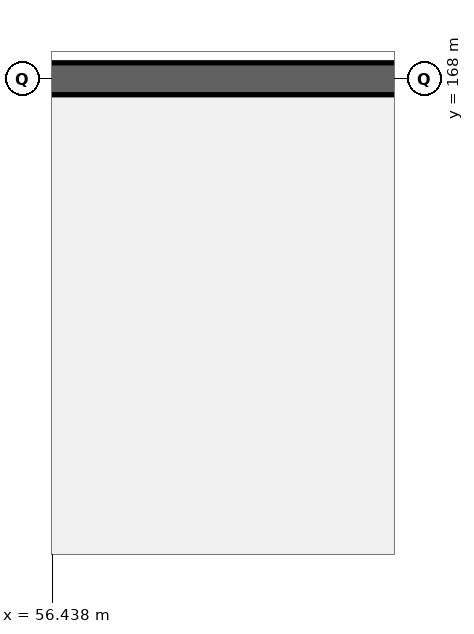
"""IFC4 building model, lengths in metres.
Left out: names, types, materials, properties, quantities, classifications, styles, units other than length and angle.
Written with IfcOpenShell. Run it as: python <this file> out.ifc"""

import sys

from ifc_helpers import new_model, si_unit, direction, frame, frame_2d, origin, place, context, subcontext, project, spatial, rectangle, extrude, element, save


model = new_model("IFC4")
c1 = context("Model", 3, precision=1e-05, world=origin(), true_north=direction((0.0, 1.0)))
c2 = subcontext(c1, "Body", "Model", "MODEL_VIEW")
j1 = project(units=[si_unit("LENGTHUNIT", "METRE"), si_unit("PLANEANGLEUNIT", "RADIAN")], contexts=[c1])
p1 = place(None, origin())
s1 = spatial("IfcSite", under=j1, at=p1, CompositionType="ELEMENT")
p2 = place(p1, origin())
s2 = spatial("IfcBuilding", under=s1, at=p2, CompositionType="ELEMENT")
p3 = place(p2, frame((0.0, 0.0, -4.8)))
s3 = spatial("IfcBuildingStorey", under=s2, at=p3, CompositionType="ELEMENT", Elevation=-4.8)
p4 = place(p3, frame((49.404, 168.0, 0.0), z_axis=(0.0, 0.0, 1.0), x_axis=(1.0, 0.0, 0.0)))
e1 = element("IfcWall", 1, at=p4, inside=s3, PredefinedType="STANDARD", context=c2, shape_type="SweptSolid", body=[
    extrude(rectangle(XDim=11.667, YDim=0.42, at=frame_2d((5.833, 0.0))), origin(), (0.0, 0.0, 1.0), 4.46),
])
save(model, sys.argv[1])
